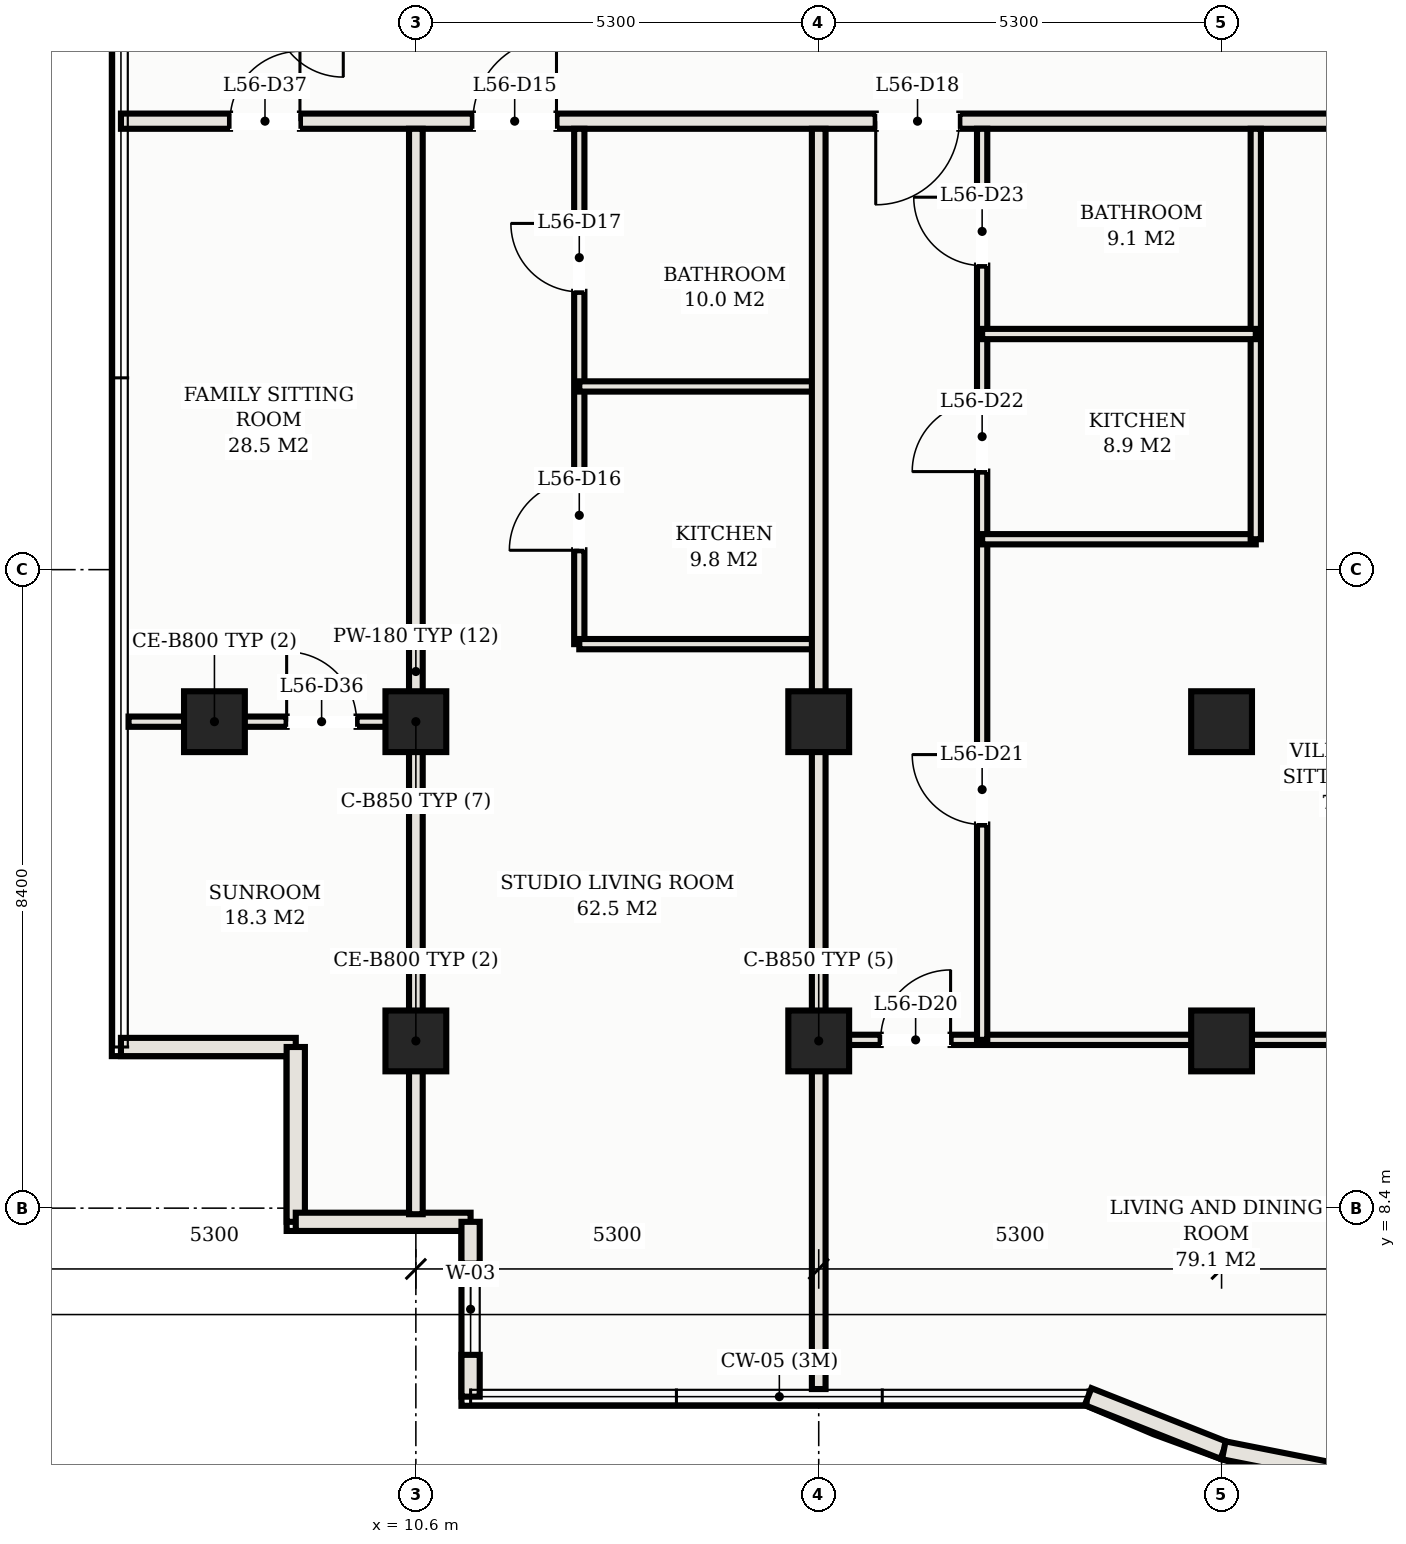
"""IFC4 building model, lengths in metres.
Left out: names, types, materials, properties, quantities, classifications, styles, units other than length and angle.
Written with IfcOpenShell. Run it as: python <this file> out.ifc"""

import sys

from ifc_helpers import new_model, si_unit, direction, frame, frame_2d, origin, origin_2d, place, context, subcontext, project, spatial, rectangle, hollow_rectangle, extrude, element, fill, save


model = new_model("IFC4")
c1 = context("Model", 3, precision=1e-05, world=origin(), true_north=direction((0.0, 1.0)))
c2 = subcontext(c1, "Body", "Model", "MODEL_VIEW")
j1 = project(units=[si_unit("LENGTHUNIT", "METRE"), si_unit("PLANEANGLEUNIT", "RADIAN")], contexts=[c1])
p1 = place(None, origin())
s1 = spatial("IfcSite", under=j1, at=p1, CompositionType="ELEMENT")
p2 = place(p1, origin())
s2 = spatial("IfcBuilding", under=s1, at=p2, CompositionType="ELEMENT")
p3 = place(p2, frame((0.0, 0.0, 206.6)))
s3 = spatial("IfcBuildingStorey", under=s2, at=p3, CompositionType="ELEMENT", Elevation=206.6)
for number, where, z_axis, x_axis in (
    (1, (10.6, 14.8, 0.0), (0.0, 0.0, 1.0), (1.0, 0.0, 0.0)),
    (2, (10.6, 10.6, 0.0), (0.0, 0.0, 1.0), (1.0, 0.0, 0.0)),
    (3, (15.9, 14.8, 0.0), (0.0, 0.0, 1.0), (1.0, 0.0, 0.0)),
    (4, (15.9, 10.6, 0.0), (0.0, 0.0, 1.0), (1.0, 0.0, 0.0)),
    (5, (21.2, 14.8, 0.0), (0.0, 0.0, 1.0), (1.0, 0.0, 0.0)),
    (6, (21.2, 10.6, 0.0), (0.0, 0.0, 1.0), (1.0, 0.0, 0.0)),
    (7, (7.95, 14.8, 0.0), (0.0, 0.0, 1.0), (1.0, 0.0, 0.0)),
):
    element("IfcColumn", number, at=place(p3, frame(where, z_axis=z_axis, x_axis=x_axis)), inside=s3, PredefinedType="COLUMN", context=c2, shape_type="SweptSolid", body=[
        extrude(hollow_rectangle(XDim=0.8, YDim=0.8, WallThickness=0.028, at=origin_2d()), origin(), (0.0, 0.0, 1.0), 3.3),
    ])
for number, where, z_axis, x_axis in (
    (8, (6.72, 10.52, 0.0), (0.0, 0.0, 1.0), (1.0, 0.0, 0.0)),
    (9, (9.02, 10.52, 0.0), (0.0, 0.0, 1.0), (0.0, -1.0, 0.0)),
    (10, (9.02, 8.22, 0.0), (0.0, 0.0, 1.0), (1.0, 0.0, 0.0)),
):
    element("IfcWall", number, at=place(p3, frame(where, z_axis=z_axis, x_axis=x_axis)), inside=s3, PredefinedType="SOLIDWALL", context=c2, shape_type="SweptSolid", body=[
        extrude(rectangle(XDim=2.3, YDim=0.24, at=frame_2d((1.15, 0.0))), origin(), (0.0, 0.0, 1.0), 3.11),
    ])
p4 = place(p3, frame((11.32, 8.22, 0.0), z_axis=(0.0, 0.0, 1.0), x_axis=(0.0, -1.0, 0.0)))
e11 = element("IfcWall", 11, at=p4, inside=s3, PredefinedType="SOLIDWALL", context=c2, shape_type="SweptSolid", body=[
    extrude(rectangle(XDim=2.3, YDim=0.24, at=frame_2d((1.15, 0.0))), origin(), (0.0, 0.0, 1.0), 3.11),
])
p5 = place(p4, frame((0.55, 0.0, 0.75)))
e12 = element("IfcOpeningElement", 12, at=p5, cuts=e11, PredefinedType="OPENING", context=c2, shape_type="SweptSolid", body=[
    extrude(rectangle(XDim=1.2, YDim=1.5, at=frame_2d((0.6, 0.75))), frame((0.0, 0.13, 0.0), z_axis=(0.0, -1.0, 0.0), x_axis=(1.0, 0.0, 0.0)), (0.0, 0.0, 1.0), 0.26),
])
p6 = place(p3, frame((19.444, 5.92, 0.0), z_axis=(0.0, 0.0, 1.0), x_axis=(0.92993442177, -0.367725401906, 0.0)))
e13 = element("IfcWall", 13, at=p6, inside=s3, PredefinedType="SOLIDWALL", context=c2, shape_type="SweptSolid", body=[
    extrude(rectangle(XDim=1.919, YDim=0.24, at=frame_2d((0.96, 0.0))), origin(), (0.0, 0.0, 1.0), 3.11),
])
p7 = place(p3, frame((21.229, 5.214, 0.0), z_axis=(0.0, 0.0, 1.0), x_axis=(0.980985349685, -0.194081796425, 0.0)))
e14 = element("IfcWall", 14, at=p7, inside=s3, PredefinedType="SOLIDWALL", context=c2, shape_type="SweptSolid", body=[
    extrude(rectangle(XDim=4.478, YDim=0.24, at=frame_2d((2.239, 0.0))), origin(), (0.0, 0.0, 1.0), 3.11),
])
p8 = place(p7, frame((1.473, 0.0, 0.0)))
e15 = element("IfcOpeningElement", 15, at=p8, cuts=e14, PredefinedType="OPENING", context=c2, shape_type="SweptSolid", body=[
    extrude(rectangle(XDim=1.8, YDim=2.2, at=frame_2d((0.9, 1.1))), frame((0.0, 0.13, 0.0), z_axis=(0.0, -1.0, 0.0), x_axis=(1.0, 0.0, 0.0)), (0.0, 0.0, 1.0), 0.26),
])
p9 = place(p3, frame((6.72, 22.7, 0.0), z_axis=(0.0, 0.0, 1.0), x_axis=(1.0, 0.0, 0.0)))
e16 = element("IfcWall", 16, at=p9, inside=s3, PredefinedType="PARTITIONING", context=c2, shape_type="SweptSolid", body=[
    extrude(rectangle(XDim=39.56, YDim=0.2, at=frame_2d((19.78, 0.0))), origin(), (0.0, 0.0, 1.0), 2.43),
])
p10 = place(p9, frame((4.63, 0.0, 0.0)))
e17 = element("IfcOpeningElement", 17, at=p10, cuts=e16, PredefinedType="OPENING", context=c2, shape_type="SweptSolid", body=[
    extrude(rectangle(XDim=1.1, YDim=2.25, at=frame_2d((0.55, 1.125))), frame((0.0, 0.11, 0.0), z_axis=(0.0, -1.0, 0.0), x_axis=(1.0, 0.0, 0.0)), (0.0, 0.0, 1.0), 0.22),
])
p11 = place(p9, frame((9.93, 0.0, 0.0)))
e18 = element("IfcOpeningElement", 18, at=p11, cuts=e16, PredefinedType="OPENING", context=c2, shape_type="SweptSolid", body=[
    extrude(rectangle(XDim=1.1, YDim=2.25, at=frame_2d((0.55, 1.125))), frame((0.0, 0.11, 0.0), z_axis=(0.0, -1.0, 0.0), x_axis=(1.0, 0.0, 0.0)), (0.0, 0.0, 1.0), 0.22),
])
p12 = place(p9, frame((25.83, 0.0, 0.0)))
e19 = element("IfcOpeningElement", 19, at=p12, cuts=e16, PredefinedType="OPENING", context=c2, shape_type="SweptSolid", body=[
    extrude(rectangle(XDim=1.1, YDim=2.25, at=frame_2d((0.55, 1.125))), frame((0.0, 0.11, 0.0), z_axis=(0.0, -1.0, 0.0), x_axis=(1.0, 0.0, 0.0)), (0.0, 0.0, 1.0), 0.22),
])
p13 = place(p9, frame((1.435, 0.0, 0.0)))
e20 = element("IfcOpeningElement", 20, at=p13, cuts=e16, PredefinedType="OPENING", context=c2, shape_type="SweptSolid", body=[
    extrude(rectangle(XDim=0.92, YDim=2.15, at=frame_2d((0.46, 1.075))), frame((0.0, 0.11, 0.0), z_axis=(0.0, -1.0, 0.0), x_axis=(1.0, 0.0, 0.0)), (0.0, 0.0, 1.0), 0.22),
])
p14 = place(p9, frame((37.205, 0.0, 0.0)))
e21 = element("IfcOpeningElement", 21, at=p14, cuts=e16, PredefinedType="OPENING", context=c2, shape_type="SweptSolid", body=[
    extrude(rectangle(XDim=0.92, YDim=2.15, at=frame_2d((0.46, 1.075))), frame((0.0, 0.11, 0.0), z_axis=(0.0, -1.0, 0.0), x_axis=(1.0, 0.0, 0.0)), (0.0, 0.0, 1.0), 0.22),
])
p15 = place(p3, frame((10.6, 8.32, 0.0), z_axis=(0.0, 0.0, 1.0), x_axis=(0.0, 1.0, 0.0)))
e22 = element("IfcWall", 22, at=p15, inside=s3, PredefinedType="PARTITIONING", context=c2, shape_type="SweptSolid", body=[
    extrude(rectangle(XDim=14.28, YDim=0.18, at=frame_2d((7.14, 0.0))), origin(), (0.0, 0.0, 1.0), 2.43),
])
p16 = place(p3, frame((12.75, 15.82, 0.0), z_axis=(0.0, 0.0, 1.0), x_axis=(0.0, 1.0, 0.0)))
e23 = element("IfcWall", 23, at=p16, inside=s3, PredefinedType="PARTITIONING", context=c2, shape_type="SweptSolid", body=[
    extrude(rectangle(XDim=6.78, YDim=0.135, at=frame_2d((3.39, 0.0))), origin(), (0.0, 0.0, 1.0), 2.43),
])
p17 = place(p16, frame((1.235, 0.0, 0.0)))
e24 = element("IfcOpeningElement", 24, at=p17, cuts=e23, PredefinedType="OPENING", context=c2, shape_type="SweptSolid", body=[
    extrude(rectangle(XDim=0.92, YDim=2.15, at=frame_2d((0.46, 1.075))), frame((0.0, 0.078, 0.0), z_axis=(0.0, -1.0, 0.0), x_axis=(1.0, 0.0, 0.0)), (0.0, 0.0, 1.0), 0.155),
])
p18 = place(p16, frame((4.635, 0.0, 0.0)))
e25 = element("IfcOpeningElement", 25, at=p18, cuts=e23, PredefinedType="OPENING", context=c2, shape_type="SweptSolid", body=[
    extrude(rectangle(XDim=0.9, YDim=2.15, at=frame_2d((0.45, 1.075))), frame((0.0, 0.078, 0.0), z_axis=(0.0, -1.0, 0.0), x_axis=(1.0, 0.0, 0.0)), (0.0, 0.0, 1.0), 0.155),
])
for number, where, z_axis, x_axis in (
    (26, (12.75, 15.82, 0.0), (0.0, 0.0, 1.0), (1.0, 0.0, 0.0)),
    (27, (12.75, 19.21, 0.0), (0.0, 0.0, 1.0), (1.0, 0.0, 0.0)),
):
    element("IfcWall", number, at=place(p3, frame(where, z_axis=z_axis, x_axis=x_axis)), inside=s3, PredefinedType="PARTITIONING", context=c2, shape_type="SweptSolid", body=[
        extrude(rectangle(XDim=3.15, YDim=0.135, at=frame_2d((1.575, 0.0))), origin(), (0.0, 0.0, 1.0), 2.43),
    ])
p19 = place(p3, frame((15.9, 6.02, 0.0), z_axis=(0.0, 0.0, 1.0), x_axis=(0.0, 1.0, 0.0)))
e28 = element("IfcWall", 28, at=p19, inside=s3, PredefinedType="PARTITIONING", context=c2, shape_type="SweptSolid", body=[
    extrude(rectangle(XDim=16.58, YDim=0.18, at=frame_2d((8.29, 0.0))), origin(), (0.0, 0.0, 1.0), 2.43),
])
p20 = place(p3, frame((15.9, 10.614, 0.0), z_axis=(0.0, 0.0, 1.0), x_axis=(1.0, 0.0, 0.0)))
e29 = element("IfcWall", 29, at=p20, inside=s3, PredefinedType="PARTITIONING", context=c2, shape_type="SweptSolid", body=[
    extrude(rectangle(XDim=10.6, YDim=0.135, at=frame_2d((5.3, 0.0))), origin(), (0.0, 0.0, 1.0), 2.43),
])
p21 = place(p20, frame((0.815, 0.0, 0.0)))
e30 = element("IfcOpeningElement", 30, at=p21, cuts=e29, PredefinedType="OPENING", context=c2, shape_type="SweptSolid", body=[
    extrude(rectangle(XDim=0.92, YDim=2.15, at=frame_2d((0.46, 1.075))), frame((0.0, 0.078, 0.0), z_axis=(0.0, -1.0, 0.0), x_axis=(1.0, 0.0, 0.0)), (0.0, 0.0, 1.0), 0.155),
])
p22 = place(p3, frame((18.05, 10.614, 0.0), z_axis=(0.0, 0.0, 1.0), x_axis=(0.0, 1.0, 0.0)))
e31 = element("IfcWall", 31, at=p22, inside=s3, PredefinedType="PARTITIONING", context=c2, shape_type="SweptSolid", body=[
    extrude(rectangle(XDim=11.986, YDim=0.135, at=frame_2d((5.993, 0.0))), origin(), (0.0, 0.0, 1.0), 2.43),
])
p23 = place(p22, frame((2.833, 0.0, 0.0)))
e32 = element("IfcOpeningElement", 32, at=p23, cuts=e31, PredefinedType="OPENING", context=c2, shape_type="SweptSolid", body=[
    extrude(rectangle(XDim=0.92, YDim=2.15, at=frame_2d((0.46, 1.075))), frame((0.0, 0.078, 0.0), z_axis=(0.0, -1.0, 0.0), x_axis=(1.0, 0.0, 0.0)), (0.0, 0.0, 1.0), 0.155),
])
p24 = place(p22, frame((7.476, 0.0, 0.0)))
e33 = element("IfcOpeningElement", 33, at=p24, cuts=e31, PredefinedType="OPENING", context=c2, shape_type="SweptSolid", body=[
    extrude(rectangle(XDim=0.92, YDim=2.15, at=frame_2d((0.46, 1.075))), frame((0.0, 0.078, 0.0), z_axis=(0.0, -1.0, 0.0), x_axis=(1.0, 0.0, 0.0)), (0.0, 0.0, 1.0), 0.155),
])
p25 = place(p22, frame((10.186, 0.0, 0.0)))
e34 = element("IfcOpeningElement", 34, at=p25, cuts=e31, PredefinedType="OPENING", context=c2, shape_type="SweptSolid", body=[
    extrude(rectangle(XDim=0.9, YDim=2.15, at=frame_2d((0.45, 1.075))), frame((0.0, 0.078, 0.0), z_axis=(0.0, -1.0, 0.0), x_axis=(1.0, 0.0, 0.0)), (0.0, 0.0, 1.0), 0.155),
])
p26 = place(p3, frame((18.05, 17.2, 0.0), z_axis=(0.0, 0.0, 1.0), x_axis=(1.0, 0.0, 0.0)))
e35 = element("IfcWall", 35, at=p26, inside=s3, PredefinedType="PARTITIONING", context=c2, shape_type="SweptSolid", body=[
    extrude(rectangle(XDim=3.6, YDim=0.135, at=frame_2d((1.8, 0.0))), origin(), (0.0, 0.0, 1.0), 2.43),
])
p27 = place(p3, frame((21.65, 17.2, 0.0), z_axis=(0.0, 0.0, 1.0), x_axis=(0.0, 1.0, 0.0)))
e36 = element("IfcWall", 36, at=p27, inside=s3, PredefinedType="PARTITIONING", context=c2, shape_type="SweptSolid", body=[
    extrude(rectangle(XDim=5.4, YDim=0.135, at=frame_2d((2.7, 0.0))), origin(), (0.0, 0.0, 1.0), 2.43),
])
p28 = place(p3, frame((18.05, 19.9, 0.0), z_axis=(0.0, 0.0, 1.0), x_axis=(1.0, 0.0, 0.0)))
e37 = element("IfcWall", 37, at=p28, inside=s3, PredefinedType="PARTITIONING", context=c2, shape_type="SweptSolid", body=[
    extrude(rectangle(XDim=3.6, YDim=0.135, at=frame_2d((1.8, 0.0))), origin(), (0.0, 0.0, 1.0), 2.43),
])
p29 = place(p3, frame((6.82, 14.8, 0.0), z_axis=(0.0, 0.0, 1.0), x_axis=(1.0, 0.0, 0.0)))
e38 = element("IfcWall", 38, at=p29, inside=s3, PredefinedType="PARTITIONING", context=c2, shape_type="SweptSolid", body=[
    extrude(rectangle(XDim=3.78, YDim=0.135, at=frame_2d((1.89, 0.0))), origin(), (0.0, 0.0, 1.0), 2.43),
])
p30 = place(p29, frame((2.08, 0.0, 0.0)))
e39 = element("IfcOpeningElement", 39, at=p30, cuts=e38, PredefinedType="OPENING", context=c2, shape_type="SweptSolid", body=[
    extrude(rectangle(XDim=0.92, YDim=2.15, at=frame_2d((0.46, 1.075))), frame((0.0, 0.078, 0.0), z_axis=(0.0, -1.0, 0.0), x_axis=(1.0, 0.0, 0.0)), (0.0, 0.0, 1.0), 0.155),
])
p31 = place(p5, origin())
e40 = element("IfcWindow", 40, at=p31, inside=s3, PartitioningType="SINGLE_PANEL", PredefinedType="WINDOW", context=c2, shape_type="SweptSolid", body=[
    extrude(rectangle(XDim=1.2, YDim=1.5, at=frame_2d((0.6, 0.75))), frame((0.0, 0.03, 0.0), z_axis=(0.0, -1.0, 0.0), x_axis=(1.0, 0.0, 0.0)), (0.0, 0.0, 1.0), 0.06),
])
fill(e12, e40)
p32 = place(p10, origin())
e41 = element("IfcDoor", 41, at=p32, inside=s3, OperationType="SINGLE_SWING_RIGHT", PredefinedType="DOOR", context=c2, shape_type="SweptSolid", body=[
    extrude(rectangle(XDim=1.1, YDim=2.25, at=frame_2d((0.55, 1.125))), frame((0.0, 0.025, 0.0), z_axis=(0.0, -1.0, 0.0), x_axis=(1.0, 0.0, 0.0)), (0.0, 0.0, 1.0), 0.05),
])
fill(e17, e41)
p33 = place(p17, origin())
e42 = element("IfcDoor", 42, at=p33, inside=s3, OperationType="SINGLE_SWING_LEFT", PredefinedType="DOOR", context=c2, shape_type="SweptSolid", body=[
    extrude(rectangle(XDim=0.92, YDim=2.15, at=frame_2d((0.46, 1.075))), frame((0.0, 0.025, 0.0), z_axis=(0.0, -1.0, 0.0), x_axis=(1.0, 0.0, 0.0)), (0.0, 0.0, 1.0), 0.05),
])
fill(e24, e42)
p34 = place(p18, origin())
e43 = element("IfcDoor", 43, at=p34, inside=s3, OperationType="SINGLE_SWING_RIGHT", PredefinedType="DOOR", context=c2, shape_type="SweptSolid", body=[
    extrude(rectangle(XDim=0.9, YDim=2.15, at=frame_2d((0.45, 1.075))), frame((0.0, 0.025, 0.0), z_axis=(0.0, -1.0, 0.0), x_axis=(1.0, 0.0, 0.0)), (0.0, 0.0, 1.0), 0.05),
])
fill(e25, e43)
p35 = place(p11, frame((1.1, 0.0, 0.0), z_axis=(0.0, 0.0, 1.0), x_axis=(-1.0, 0.0, 0.0)))
e44 = element("IfcDoor", 44, at=p35, inside=s3, OperationType="SINGLE_SWING_RIGHT", PredefinedType="DOOR", context=c2, shape_type="SweptSolid", body=[
    extrude(rectangle(XDim=1.1, YDim=2.25, at=frame_2d((0.55, 1.125))), frame((0.0, 0.025, 0.0), z_axis=(0.0, -1.0, 0.0), x_axis=(1.0, 0.0, 0.0)), (0.0, 0.0, 1.0), 0.05),
])
fill(e18, e44)
p36 = place(p21, origin())
e45 = element("IfcDoor", 45, at=p36, inside=s3, OperationType="SINGLE_SWING_RIGHT", PredefinedType="DOOR", context=c2, shape_type="SweptSolid", body=[
    extrude(rectangle(XDim=0.92, YDim=2.15, at=frame_2d((0.46, 1.075))), frame((0.0, 0.025, 0.0), z_axis=(0.0, -1.0, 0.0), x_axis=(1.0, 0.0, 0.0)), (0.0, 0.0, 1.0), 0.05),
])
fill(e30, e45)
p37 = place(p23, origin())
e46 = element("IfcDoor", 46, at=p37, inside=s3, OperationType="SINGLE_SWING_RIGHT", PredefinedType="DOOR", context=c2, shape_type="SweptSolid", body=[
    extrude(rectangle(XDim=0.92, YDim=2.15, at=frame_2d((0.46, 1.075))), frame((0.0, 0.025, 0.0), z_axis=(0.0, -1.0, 0.0), x_axis=(1.0, 0.0, 0.0)), (0.0, 0.0, 1.0), 0.05),
])
fill(e32, e46)
p38 = place(p24, origin())
e47 = element("IfcDoor", 47, at=p38, inside=s3, OperationType="SINGLE_SWING_LEFT", PredefinedType="DOOR", context=c2, shape_type="SweptSolid", body=[
    extrude(rectangle(XDim=0.92, YDim=2.15, at=frame_2d((0.46, 1.075))), frame((0.0, 0.025, 0.0), z_axis=(0.0, -1.0, 0.0), x_axis=(1.0, 0.0, 0.0)), (0.0, 0.0, 1.0), 0.05),
])
fill(e33, e47)
p39 = place(p25, origin())
e48 = element("IfcDoor", 48, at=p39, inside=s3, OperationType="SINGLE_SWING_RIGHT", PredefinedType="DOOR", context=c2, shape_type="SweptSolid", body=[
    extrude(rectangle(XDim=0.9, YDim=2.15, at=frame_2d((0.45, 1.075))), frame((0.0, 0.025, 0.0), z_axis=(0.0, -1.0, 0.0), x_axis=(1.0, 0.0, 0.0)), (0.0, 0.0, 1.0), 0.05),
])
fill(e34, e48)
p40 = place(p30, origin())
e49 = element("IfcDoor", 49, at=p40, inside=s3, OperationType="SINGLE_SWING_LEFT", PredefinedType="DOOR", context=c2, shape_type="SweptSolid", body=[
    extrude(rectangle(XDim=0.92, YDim=2.15, at=frame_2d((0.46, 1.075))), frame((0.0, 0.025, 0.0), z_axis=(0.0, -1.0, 0.0), x_axis=(1.0, 0.0, 0.0)), (0.0, 0.0, 1.0), 0.05),
])
fill(e39, e49)
p41 = place(p13, origin())
e50 = element("IfcDoor", 50, at=p41, inside=s3, OperationType="SINGLE_SWING_RIGHT", PredefinedType="DOOR", context=c2, shape_type="SweptSolid", body=[
    extrude(rectangle(XDim=0.92, YDim=2.15, at=frame_2d((0.46, 1.075))), frame((0.0, 0.025, 0.0), z_axis=(0.0, -1.0, 0.0), x_axis=(1.0, 0.0, 0.0)), (0.0, 0.0, 1.0), 0.05),
])
fill(e20, e50)
save(model, sys.argv[1])
